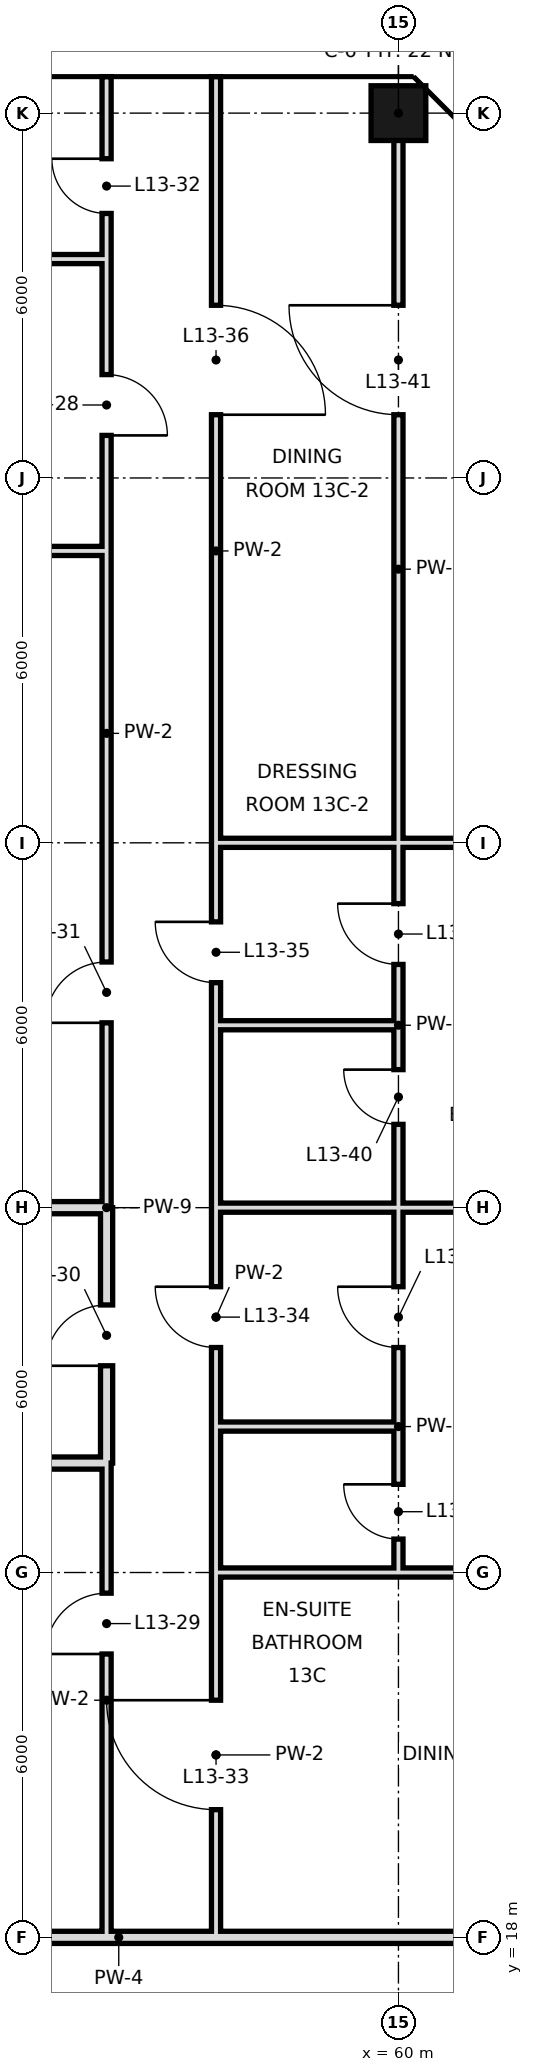
"""IFC4 building model, lengths in metres.
Left out: names, types, materials, properties, quantities, classifications, styles, units other than length and angle.
Written with IfcOpenShell. Run it as: python <this file> out.ifc"""

import sys

from ifc_helpers import new_model, si_unit, direction, frame, frame_2d, origin, origin_2d, place, context, subcontext, project, spatial, rectangle, hollow_rectangle, extrude, element, fill, save


model = new_model("IFC4")
c1 = context("Model", 3, precision=1e-05, world=origin(), true_north=direction((0.0, 1.0)))
c2 = subcontext(c1, "Body", "Model", "MODEL_VIEW")
j1 = project(units=[si_unit("LENGTHUNIT", "METRE"), si_unit("PLANEANGLEUNIT", "RADIAN")], contexts=[c1])
p1 = place(None, origin())
s1 = spatial("IfcSite", under=j1, at=p1, CompositionType="ELEMENT")
p2 = place(p1, origin())
s2 = spatial("IfcBuilding", under=s1, at=p2, CompositionType="ELEMENT")
p3 = place(p2, frame((0.0, 0.0, 67.8)))
s3 = spatial("IfcBuildingStorey", under=s2, at=p3, CompositionType="ELEMENT", Elevation=67.8)
p4 = place(p3, frame((60.0, 48.0, 0.0), z_axis=(0.0, 0.0, 1.0), x_axis=(1.0, 0.0, 0.0)))
e1 = element("IfcColumn", 1, at=p4, inside=s3, PredefinedType="COLUMN", context=c2, shape_type="SweptSolid", body=[
    extrude(hollow_rectangle(XDim=0.9, YDim=0.9, WallThickness=0.045, at=origin_2d()), origin(), (0.0, 0.0, 1.0), 3.6),
])
p5 = place(p3, frame((55.2, 25.8, 0.0), z_axis=(0.0, 0.0, 1.0), x_axis=(0.0, 1.0, 0.0)))
e2 = element("IfcWall", 2, at=p5, inside=s3, PredefinedType="SOLIDWALL", context=c2, shape_type="SweptSolid", body=[
    extrude(rectangle(XDim=4.2, YDim=0.2, at=frame_2d((2.1, 0.0))), origin(), (0.0, 0.0, 1.0), 2.52),
])
p6 = place(p5, frame((1.6, 0.0, 0.0)))
e3 = element("IfcOpeningElement", 3, at=p6, cuts=e2, PredefinedType="OPENING", context=c2, shape_type="SweptSolid", body=[
    extrude(rectangle(XDim=1.0, YDim=2.4, at=frame_2d((0.5, 1.2))), frame((0.0, 0.11, 0.0), z_axis=(0.0, -1.0, 0.0), x_axis=(1.0, 0.0, 0.0)), (0.0, 0.0, 1.0), 0.22),
])
p7 = place(p3, frame((55.2, 18.0, 0.0), z_axis=(0.0, 0.0, 1.0), x_axis=(0.0, 1.0, 0.0)))
e4 = element("IfcWall", 4, at=p7, inside=s3, PredefinedType="PARTITIONING", context=c2, shape_type="SweptSolid", body=[
    extrude(rectangle(XDim=7.8, YDim=0.15, at=frame_2d((3.9, 0.0))), origin(), (0.0, 0.0, 1.0), 3.42),
])
p8 = place(p7, frame((4.66, 0.0, 0.0)))
e5 = element("IfcOpeningElement", 5, at=p8, cuts=e4, PredefinedType="OPENING", context=c2, shape_type="SweptSolid", body=[
    extrude(rectangle(XDim=1.0, YDim=2.4, at=frame_2d((0.5, 1.2))), frame((0.0, 0.085, 0.0), z_axis=(0.0, -1.0, 0.0), x_axis=(1.0, 0.0, 0.0)), (0.0, 0.0, 1.0), 0.17),
])
p9 = place(p3, frame((55.2, 30.0, 0.0), z_axis=(0.0, 0.0, 1.0), x_axis=(0.0, 1.0, 0.0)))
e6 = element("IfcWall", 6, at=p9, inside=s3, PredefinedType="PARTITIONING", context=c2, shape_type="SweptSolid", body=[
    extrude(rectangle(XDim=15.6, YDim=0.15, at=frame_2d((7.8, 0.0))), origin(), (0.0, 0.0, 1.0), 3.42),
])
p10 = place(p9, frame((12.7, 0.0, 0.0)))
e7 = element("IfcOpeningElement", 7, at=p10, cuts=e6, PredefinedType="OPENING", context=c2, shape_type="SweptSolid", body=[
    extrude(rectangle(XDim=1.0, YDim=2.4, at=frame_2d((0.5, 1.2))), frame((0.0, 0.085, 0.0), z_axis=(0.0, -1.0, 0.0), x_axis=(1.0, 0.0, 0.0)), (0.0, 0.0, 1.0), 0.17),
])
p11 = place(p9, frame((3.04, 0.0, 0.0)))
e8 = element("IfcOpeningElement", 8, at=p11, cuts=e6, PredefinedType="OPENING", context=c2, shape_type="SweptSolid", body=[
    extrude(rectangle(XDim=1.0, YDim=2.4, at=frame_2d((0.5, 1.2))), frame((0.0, 0.085, 0.0), z_axis=(0.0, -1.0, 0.0), x_axis=(1.0, 0.0, 0.0)), (0.0, 0.0, 1.0), 0.17),
])
p12 = place(p3, frame((55.2, 45.6, 0.0), z_axis=(0.0, 0.0, 1.0), x_axis=(0.0, 1.0, 0.0)))
e9 = element("IfcWall", 9, at=p12, inside=s3, PredefinedType="PARTITIONING", context=c2, shape_type="SweptSolid", body=[
    extrude(rectangle(XDim=3.0, YDim=0.15, at=frame_2d((1.5, 0.0))), origin(), (0.0, 0.0, 1.0), 3.42),
])
p13 = place(p12, frame((0.75, 0.0, 0.0)))
e10 = element("IfcOpeningElement", 10, at=p13, cuts=e9, PredefinedType="OPENING", context=c2, shape_type="SweptSolid", body=[
    extrude(rectangle(XDim=0.9, YDim=2.4, at=frame_2d((0.45, 1.2))), frame((0.0, 0.085, 0.0), z_axis=(0.0, -1.0, 0.0), x_axis=(1.0, 0.0, 0.0)), (0.0, 0.0, 1.0), 0.17),
])
p14 = place(p3, frame((57.0, 18.0, 0.0), z_axis=(0.0, 0.0, 1.0), x_axis=(0.0, 1.0, 0.0)))
e11 = element("IfcWall", 11, at=p14, inside=s3, PredefinedType="PARTITIONING", context=c2, shape_type="SweptSolid", body=[
    extrude(rectangle(XDim=6.0, YDim=0.15, at=frame_2d((3.0, 0.0))), origin(), (0.0, 0.0, 1.0), 3.42),
])
p15 = place(p14, frame((2.1, 0.0, 0.0)))
e12 = element("IfcOpeningElement", 12, at=p15, cuts=e11, PredefinedType="OPENING", context=c2, shape_type="SweptSolid", body=[
    extrude(rectangle(XDim=1.8, YDim=2.4, at=frame_2d((0.9, 1.2))), frame((0.0, 0.085, 0.0), z_axis=(0.0, -1.0, 0.0), x_axis=(1.0, 0.0, 0.0)), (0.0, 0.0, 1.0), 0.17),
])
p16 = place(p3, frame((57.0, 26.4, 0.0), z_axis=(0.0, 0.0, 1.0), x_axis=(0.0, 1.0, 0.0)))
e13 = element("IfcWall", 13, at=p16, inside=s3, PredefinedType="PARTITIONING", context=c2, shape_type="SweptSolid", body=[
    extrude(rectangle(XDim=3.6, YDim=0.15, at=frame_2d((1.8, 0.0))), origin(), (0.0, 0.0, 1.0), 3.42),
])
p17 = place(p16, frame((1.3, 0.0, 0.0)))
e14 = element("IfcOpeningElement", 14, at=p17, cuts=e13, PredefinedType="OPENING", context=c2, shape_type="SweptSolid", body=[
    extrude(rectangle(XDim=1.0, YDim=2.4, at=frame_2d((0.5, 1.2))), frame((0.0, 0.085, 0.0), z_axis=(0.0, -1.0, 0.0), x_axis=(1.0, 0.0, 0.0)), (0.0, 0.0, 1.0), 0.17),
])
p18 = place(p3, frame((57.0, 33.0, 0.0), z_axis=(0.0, 0.0, 1.0), x_axis=(0.0, 1.0, 0.0)))
e15 = element("IfcWall", 15, at=p18, inside=s3, PredefinedType="PARTITIONING", context=c2, shape_type="SweptSolid", body=[
    extrude(rectangle(XDim=15.6, YDim=0.15, at=frame_2d((7.8, 0.0))), origin(), (0.0, 0.0, 1.0), 3.42),
])
p19 = place(p18, frame((0.7, 0.0, 0.0)))
e16 = element("IfcOpeningElement", 16, at=p19, cuts=e15, PredefinedType="OPENING", context=c2, shape_type="SweptSolid", body=[
    extrude(rectangle(XDim=1.0, YDim=2.4, at=frame_2d((0.5, 1.2))), frame((0.0, 0.085, 0.0), z_axis=(0.0, -1.0, 0.0), x_axis=(1.0, 0.0, 0.0)), (0.0, 0.0, 1.0), 0.17),
])
p20 = place(p18, frame((10.04, 0.0, 0.0)))
e17 = element("IfcOpeningElement", 17, at=p20, cuts=e15, PredefinedType="OPENING", context=c2, shape_type="SweptSolid", body=[
    extrude(rectangle(XDim=1.8, YDim=2.4, at=frame_2d((0.9, 1.2))), frame((0.0, 0.085, 0.0), z_axis=(0.0, -1.0, 0.0), x_axis=(1.0, 0.0, 0.0)), (0.0, 0.0, 1.0), 0.17),
])
p21 = place(p3, frame((57.0, 24.0, 0.0), z_axis=(0.0, 0.0, 1.0), x_axis=(0.0, 1.0, 0.0)))
e18 = element("IfcWall", 18, at=p21, inside=s3, PredefinedType="PARTITIONING", context=c2, shape_type="SweptSolid", body=[
    extrude(rectangle(XDim=2.4, YDim=0.15, at=frame_2d((1.2, 0.0))), origin(), (0.0, 0.0, 1.0), 3.42),
])
p22 = place(p3, frame((57.0, 30.0, 0.0), z_axis=(0.0, 0.0, 1.0), x_axis=(0.0, 1.0, 0.0)))
e19 = element("IfcWall", 19, at=p22, inside=s3, PredefinedType="PARTITIONING", context=c2, shape_type="SweptSolid", body=[
    extrude(rectangle(XDim=3.0, YDim=0.15, at=frame_2d((1.5, 0.0))), origin(), (0.0, 0.0, 1.0), 3.42),
])
p23 = place(p3, frame((60.0, 26.4, 0.0), z_axis=(0.0, 0.0, 1.0), x_axis=(0.0, 1.0, 0.0)))
e20 = element("IfcWall", 20, at=p23, inside=s3, PredefinedType="PARTITIONING", context=c2, shape_type="SweptSolid", body=[
    extrude(rectangle(XDim=3.6, YDim=0.15, at=frame_2d((1.8, 0.0))), origin(), (0.0, 0.0, 1.0), 3.42),
])
p24 = place(p23, frame((1.3, 0.0, 0.0)))
e21 = element("IfcOpeningElement", 21, at=p24, cuts=e20, PredefinedType="OPENING", context=c2, shape_type="SweptSolid", body=[
    extrude(rectangle(XDim=1.0, YDim=2.4, at=frame_2d((0.5, 1.2))), frame((0.0, 0.085, 0.0), z_axis=(0.0, -1.0, 0.0), x_axis=(1.0, 0.0, 0.0)), (0.0, 0.0, 1.0), 0.17),
])
p25 = place(p3, frame((60.0, 33.0, 0.0), z_axis=(0.0, 0.0, 1.0), x_axis=(0.0, 1.0, 0.0)))
e22 = element("IfcWall", 22, at=p25, inside=s3, PredefinedType="PARTITIONING", context=c2, shape_type="SweptSolid", body=[
    extrude(rectangle(XDim=15.0, YDim=0.15, at=frame_2d((7.5, 0.0))), origin(), (0.0, 0.0, 1.0), 3.42),
])
p26 = place(p25, frame((1.0, 0.0, 0.0)))
e23 = element("IfcOpeningElement", 23, at=p26, cuts=e22, PredefinedType="OPENING", context=c2, shape_type="SweptSolid", body=[
    extrude(rectangle(XDim=1.0, YDim=2.4, at=frame_2d((0.5, 1.2))), frame((0.0, 0.085, 0.0), z_axis=(0.0, -1.0, 0.0), x_axis=(1.0, 0.0, 0.0)), (0.0, 0.0, 1.0), 0.17),
])
p27 = place(p25, frame((10.04, 0.0, 0.0)))
e24 = element("IfcOpeningElement", 24, at=p27, cuts=e22, PredefinedType="OPENING", context=c2, shape_type="SweptSolid", body=[
    extrude(rectangle(XDim=1.8, YDim=2.4, at=frame_2d((0.9, 1.2))), frame((0.0, 0.085, 0.0), z_axis=(0.0, -1.0, 0.0), x_axis=(1.0, 0.0, 0.0)), (0.0, 0.0, 1.0), 0.17),
])
p28 = place(p3, frame((60.0, 24.0, 0.0), z_axis=(0.0, 0.0, 1.0), x_axis=(0.0, 1.0, 0.0)))
e25 = element("IfcWall", 25, at=p28, inside=s3, PredefinedType="PARTITIONING", context=c2, shape_type="SweptSolid", body=[
    extrude(rectangle(XDim=2.4, YDim=0.15, at=frame_2d((1.2, 0.0))), origin(), (0.0, 0.0, 1.0), 3.42),
])
p29 = place(p28, frame((0.55, 0.0, 0.0)))
e26 = element("IfcOpeningElement", 26, at=p29, cuts=e25, PredefinedType="OPENING", context=c2, shape_type="SweptSolid", body=[
    extrude(rectangle(XDim=0.9, YDim=2.4, at=frame_2d((0.45, 1.2))), frame((0.0, 0.085, 0.0), z_axis=(0.0, -1.0, 0.0), x_axis=(1.0, 0.0, 0.0)), (0.0, 0.0, 1.0), 0.17),
])
p30 = place(p3, frame((60.0, 30.0, 0.0), z_axis=(0.0, 0.0, 1.0), x_axis=(0.0, 1.0, 0.0)))
e27 = element("IfcWall", 27, at=p30, inside=s3, PredefinedType="PARTITIONING", context=c2, shape_type="SweptSolid", body=[
    extrude(rectangle(XDim=3.0, YDim=0.15, at=frame_2d((1.5, 0.0))), origin(), (0.0, 0.0, 1.0), 3.42),
])
p31 = place(p30, frame((1.37, 0.0, 0.0)))
e28 = element("IfcOpeningElement", 28, at=p31, cuts=e27, PredefinedType="OPENING", context=c2, shape_type="SweptSolid", body=[
    extrude(rectangle(XDim=0.9, YDim=2.4, at=frame_2d((0.45, 1.2))), frame((0.0, 0.085, 0.0), z_axis=(0.0, -1.0, 0.0), x_axis=(1.0, 0.0, 0.0)), (0.0, 0.0, 1.0), 0.17),
])
p32 = place(p3, frame((44.9, 18.0, 0.0), z_axis=(0.0, 0.0, 1.0), x_axis=(1.0, 0.0, 0.0)))
e29 = element("IfcWall", 29, at=p32, inside=s3, PredefinedType="SOLIDWALL", context=c2, shape_type="SweptSolid", body=[
    extrude(rectangle(XDim=21.7, YDim=0.2, at=frame_2d((10.85, 0.0))), origin(), (0.0, 0.0, 1.0), 2.52),
])
p33 = place(p3, frame((60.0, 24.0, 0.0), z_axis=(0.0, 0.0, 1.0), x_axis=(1.0, 0.0, 0.0)))
e30 = element("IfcWall", 30, at=p33, inside=s3, PredefinedType="PARTITIONING", context=c2, shape_type="SweptSolid", body=[
    extrude(rectangle(XDim=6.0, YDim=0.15, at=frame_2d((3.0, 0.0))), origin(), (0.0, 0.0, 1.0), 2.52),
])
p34 = place(p3, frame((57.0, 24.0, 0.0), z_axis=(0.0, 0.0, 1.0), x_axis=(1.0, 0.0, 0.0)))
e31 = element("IfcWall", 31, at=p34, inside=s3, PredefinedType="PARTITIONING", context=c2, shape_type="SweptSolid", body=[
    extrude(rectangle(XDim=3.0, YDim=0.15, at=frame_2d((1.5, 0.0))), origin(), (0.0, 0.0, 1.0), 2.52),
])
p35 = place(p3, frame((44.9, 25.8, 0.0), z_axis=(0.0, 0.0, 1.0), x_axis=(1.0, 0.0, 0.0)))
e32 = element("IfcWall", 32, at=p35, inside=s3, PredefinedType="SOLIDWALL", context=c2, shape_type="SweptSolid", body=[
    extrude(rectangle(XDim=10.3, YDim=0.2, at=frame_2d((5.15, 0.0))), origin(), (0.0, 0.0, 1.0), 2.97),
])
p36 = place(p3, frame((57.0, 26.4, 0.0), z_axis=(0.0, 0.0, 1.0), x_axis=(1.0, 0.0, 0.0)))
e33 = element("IfcWall", 33, at=p36, inside=s3, PredefinedType="PARTITIONING", context=c2, shape_type="SweptSolid", body=[
    extrude(rectangle(XDim=3.0, YDim=0.15, at=frame_2d((1.5, 0.0))), origin(), (0.0, 0.0, 1.0), 3.42),
])
p37 = place(p3, frame((44.9, 30.0, 0.0), z_axis=(0.0, 0.0, 1.0), x_axis=(1.0, 0.0, 0.0)))
e34 = element("IfcWall", 34, at=p37, inside=s3, PredefinedType="SOLIDWALL", context=c2, shape_type="SweptSolid", body=[
    extrude(rectangle(XDim=10.3, YDim=0.2, at=frame_2d((5.15, 0.0))), origin(), (0.0, 0.0, 1.0), 2.52),
])
p38 = place(p3, frame((60.0, 30.0, 0.0), z_axis=(0.0, 0.0, 1.0), x_axis=(1.0, 0.0, 0.0)))
e35 = element("IfcWall", 35, at=p38, inside=s3, PredefinedType="PARTITIONING", context=c2, shape_type="SweptSolid", body=[
    extrude(rectangle(XDim=6.6, YDim=0.15, at=frame_2d((3.3, 0.0))), origin(), (0.0, 0.0, 1.0), 2.52),
])
p39 = place(p3, frame((57.0, 30.0, 0.0), z_axis=(0.0, 0.0, 1.0), x_axis=(1.0, 0.0, 0.0)))
e36 = element("IfcWall", 36, at=p39, inside=s3, PredefinedType="PARTITIONING", context=c2, shape_type="SweptSolid", body=[
    extrude(rectangle(XDim=3.0, YDim=0.15, at=frame_2d((1.5, 0.0))), origin(), (0.0, 0.0, 1.0), 2.52),
])
p40 = place(p3, frame((57.0, 33.0, 0.0), z_axis=(0.0, 0.0, 1.0), x_axis=(1.0, 0.0, 0.0)))
e37 = element("IfcWall", 37, at=p40, inside=s3, PredefinedType="PARTITIONING", context=c2, shape_type="SweptSolid", body=[
    extrude(rectangle(XDim=3.0, YDim=0.15, at=frame_2d((1.5, 0.0))), origin(), (0.0, 0.0, 1.0), 3.42),
])
p41 = place(p3, frame((57.0, 36.0, 0.0), z_axis=(0.0, 0.0, 1.0), x_axis=(1.0, 0.0, 0.0)))
e38 = element("IfcWall", 38, at=p41, inside=s3, PredefinedType="PARTITIONING", context=c2, shape_type="SweptSolid", body=[
    extrude(rectangle(XDim=9.0, YDim=0.15, at=frame_2d((4.5, 0.0))), origin(), (0.0, 0.0, 1.0), 2.52),
])
for number, where, z_axis, x_axis in (
    (39, (44.9, 40.8, 0.0), (0.0, 0.0, 1.0), (1.0, 0.0, 0.0)),
    (40, (44.9, 45.6, 0.0), (0.0, 0.0, 1.0), (1.0, 0.0, 0.0)),
):
    element("IfcWall", number, at=place(p3, frame(where, z_axis=z_axis, x_axis=x_axis)), inside=s3, PredefinedType="PARTITIONING", context=c2, shape_type="SweptSolid", body=[
        extrude(rectangle(XDim=10.3, YDim=0.15, at=frame_2d((5.15, 0.0))), origin(), (0.0, 0.0, 1.0), 3.42),
    ])
p42 = place(p10, frame((1.0, 0.0, 0.0), z_axis=(0.0, 0.0, 1.0), x_axis=(-1.0, 0.0, 0.0)))
e41 = element("IfcDoor", 41, at=p42, inside=s3, OperationType="SINGLE_SWING_RIGHT", PredefinedType="DOOR", context=c2, shape_type="SweptSolid", body=[
    extrude(rectangle(XDim=1.0, YDim=2.4, at=frame_2d((0.5, 1.2))), frame((0.0, 0.025, 0.0), z_axis=(0.0, -1.0, 0.0), x_axis=(1.0, 0.0, 0.0)), (0.0, 0.0, 1.0), 0.05),
])
fill(e7, e41)
p43 = place(p8, origin())
e42 = element("IfcDoor", 42, at=p43, inside=s3, OperationType="SINGLE_SWING_LEFT", PredefinedType="DOOR", context=c2, shape_type="SweptSolid", body=[
    extrude(rectangle(XDim=1.0, YDim=2.4, at=frame_2d((0.5, 1.2))), frame((0.0, 0.025, 0.0), z_axis=(0.0, -1.0, 0.0), x_axis=(1.0, 0.0, 0.0)), (0.0, 0.0, 1.0), 0.05),
])
fill(e5, e42)
p44 = place(p6, origin())
e43 = element("IfcDoor", 43, at=p44, inside=s3, OperationType="SINGLE_SWING_LEFT", PredefinedType="DOOR", context=c2, shape_type="SweptSolid", body=[
    extrude(rectangle(XDim=1.0, YDim=2.4, at=frame_2d((0.5, 1.2))), frame((0.0, 0.025, 0.0), z_axis=(0.0, -1.0, 0.0), x_axis=(1.0, 0.0, 0.0)), (0.0, 0.0, 1.0), 0.05),
])
fill(e3, e43)
p45 = place(p11, origin())
e44 = element("IfcDoor", 44, at=p45, inside=s3, OperationType="SINGLE_SWING_LEFT", PredefinedType="DOOR", context=c2, shape_type="SweptSolid", body=[
    extrude(rectangle(XDim=1.0, YDim=2.4, at=frame_2d((0.5, 1.2))), frame((0.0, 0.025, 0.0), z_axis=(0.0, -1.0, 0.0), x_axis=(1.0, 0.0, 0.0)), (0.0, 0.0, 1.0), 0.05),
])
fill(e8, e44)
p46 = place(p13, frame((0.9, 0.0, 0.0), z_axis=(0.0, 0.0, 1.0), x_axis=(-1.0, 0.0, 0.0)))
e45 = element("IfcDoor", 45, at=p46, inside=s3, OperationType="SINGLE_SWING_LEFT", PredefinedType="DOOR", context=c2, shape_type="SweptSolid", body=[
    extrude(rectangle(XDim=0.9, YDim=2.4, at=frame_2d((0.45, 1.2))), frame((0.0, 0.025, 0.0), z_axis=(0.0, -1.0, 0.0), x_axis=(1.0, 0.0, 0.0)), (0.0, 0.0, 1.0), 0.05),
])
fill(e10, e45)
p47 = place(p15, frame((1.8, 0.0, 0.0), z_axis=(0.0, 0.0, 1.0), x_axis=(-1.0, 0.0, 0.0)))
e46 = element("IfcDoor", 46, at=p47, inside=s3, OperationType="SINGLE_SWING_LEFT", PredefinedType="DOOR", context=c2, shape_type="SweptSolid", body=[
    extrude(rectangle(XDim=1.8, YDim=2.4, at=frame_2d((0.9, 1.2))), frame((0.0, 0.025, 0.0), z_axis=(0.0, -1.0, 0.0), x_axis=(1.0, 0.0, 0.0)), (0.0, 0.0, 1.0), 0.05),
])
fill(e12, e46)
p48 = place(p17, frame((1.0, 0.0, 0.0), z_axis=(0.0, 0.0, 1.0), x_axis=(-1.0, 0.0, 0.0)))
e47 = element("IfcDoor", 47, at=p48, inside=s3, OperationType="SINGLE_SWING_LEFT", PredefinedType="DOOR", context=c2, shape_type="SweptSolid", body=[
    extrude(rectangle(XDim=1.0, YDim=2.4, at=frame_2d((0.5, 1.2))), frame((0.0, 0.025, 0.0), z_axis=(0.0, -1.0, 0.0), x_axis=(1.0, 0.0, 0.0)), (0.0, 0.0, 1.0), 0.05),
])
fill(e14, e47)
p49 = place(p19, frame((1.0, 0.0, 0.0), z_axis=(0.0, 0.0, 1.0), x_axis=(-1.0, 0.0, 0.0)))
e48 = element("IfcDoor", 48, at=p49, inside=s3, OperationType="SINGLE_SWING_LEFT", PredefinedType="DOOR", context=c2, shape_type="SweptSolid", body=[
    extrude(rectangle(XDim=1.0, YDim=2.4, at=frame_2d((0.5, 1.2))), frame((0.0, 0.025, 0.0), z_axis=(0.0, -1.0, 0.0), x_axis=(1.0, 0.0, 0.0)), (0.0, 0.0, 1.0), 0.05),
])
fill(e16, e48)
p50 = place(p20, frame((1.8, 0.0, 0.0), z_axis=(0.0, 0.0, 1.0), x_axis=(-1.0, 0.0, 0.0)))
e49 = element("IfcDoor", 49, at=p50, inside=s3, OperationType="SINGLE_SWING_RIGHT", PredefinedType="DOOR", context=c2, shape_type="SweptSolid", body=[
    extrude(rectangle(XDim=1.8, YDim=2.4, at=frame_2d((0.9, 1.2))), frame((0.0, 0.025, 0.0), z_axis=(0.0, -1.0, 0.0), x_axis=(1.0, 0.0, 0.0)), (0.0, 0.0, 1.0), 0.05),
])
fill(e17, e49)
p51 = place(p24, frame((1.0, 0.0, 0.0), z_axis=(0.0, 0.0, 1.0), x_axis=(-1.0, 0.0, 0.0)))
e50 = element("IfcDoor", 50, at=p51, inside=s3, OperationType="SINGLE_SWING_LEFT", PredefinedType="DOOR", context=c2, shape_type="SweptSolid", body=[
    extrude(rectangle(XDim=1.0, YDim=2.4, at=frame_2d((0.5, 1.2))), frame((0.0, 0.025, 0.0), z_axis=(0.0, -1.0, 0.0), x_axis=(1.0, 0.0, 0.0)), (0.0, 0.0, 1.0), 0.05),
])
fill(e21, e50)
p52 = place(p29, frame((0.9, 0.0, 0.0), z_axis=(0.0, 0.0, 1.0), x_axis=(-1.0, 0.0, 0.0)))
e51 = element("IfcDoor", 51, at=p52, inside=s3, OperationType="SINGLE_SWING_LEFT", PredefinedType="DOOR", context=c2, shape_type="SweptSolid", body=[
    extrude(rectangle(XDim=0.9, YDim=2.4, at=frame_2d((0.45, 1.2))), frame((0.0, 0.025, 0.0), z_axis=(0.0, -1.0, 0.0), x_axis=(1.0, 0.0, 0.0)), (0.0, 0.0, 1.0), 0.05),
])
fill(e26, e51)
p53 = place(p26, frame((1.0, 0.0, 0.0), z_axis=(0.0, 0.0, 1.0), x_axis=(-1.0, 0.0, 0.0)))
e52 = element("IfcDoor", 52, at=p53, inside=s3, OperationType="SINGLE_SWING_LEFT", PredefinedType="DOOR", context=c2, shape_type="SweptSolid", body=[
    extrude(rectangle(XDim=1.0, YDim=2.4, at=frame_2d((0.5, 1.2))), frame((0.0, 0.025, 0.0), z_axis=(0.0, -1.0, 0.0), x_axis=(1.0, 0.0, 0.0)), (0.0, 0.0, 1.0), 0.05),
])
fill(e23, e52)
p54 = place(p31, frame((0.9, 0.0, 0.0), z_axis=(0.0, 0.0, 1.0), x_axis=(-1.0, 0.0, 0.0)))
e53 = element("IfcDoor", 53, at=p54, inside=s3, OperationType="SINGLE_SWING_LEFT", PredefinedType="DOOR", context=c2, shape_type="SweptSolid", body=[
    extrude(rectangle(XDim=0.9, YDim=2.4, at=frame_2d((0.45, 1.2))), frame((0.0, 0.025, 0.0), z_axis=(0.0, -1.0, 0.0), x_axis=(1.0, 0.0, 0.0)), (0.0, 0.0, 1.0), 0.05),
])
fill(e28, e53)
p55 = place(p27, frame((1.8, 0.0, 0.0), z_axis=(0.0, 0.0, 1.0), x_axis=(-1.0, 0.0, 0.0)))
e54 = element("IfcDoor", 54, at=p55, inside=s3, OperationType="SINGLE_SWING_LEFT", PredefinedType="DOOR", context=c2, shape_type="SweptSolid", body=[
    extrude(rectangle(XDim=1.8, YDim=2.4, at=frame_2d((0.9, 1.2))), frame((0.0, 0.025, 0.0), z_axis=(0.0, -1.0, 0.0), x_axis=(1.0, 0.0, 0.0)), (0.0, 0.0, 1.0), 0.05),
])
fill(e24, e54)
save(model, sys.argv[1])
